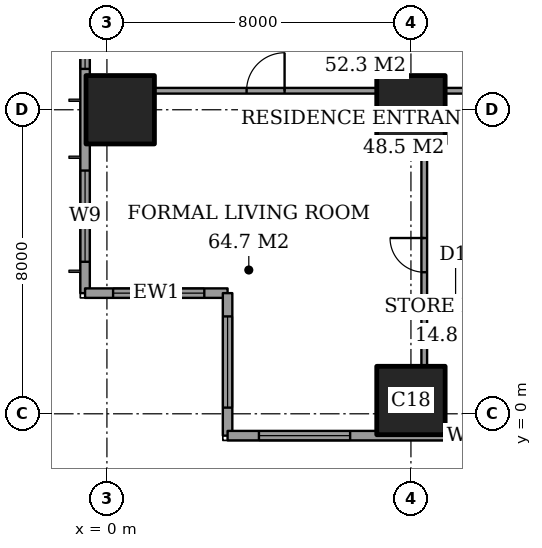
"""IFC4 building model, lengths in metres.
Left out: names, types, materials, properties, quantities, classifications, styles, units other than length and angle.
Written with IfcOpenShell. Run it as: python <this file> out.ifc"""

import sys

from ifc_helpers import new_model, si_unit, direction, frame, frame_2d, origin, origin_2d, place, context, subcontext, project, spatial, rectangle, extrude, element, fill, save


model = new_model("IFC4")
c1 = context("Model", 3, precision=1e-05, world=origin(), true_north=direction((0.0, 1.0)))
c2 = subcontext(c1, "Body", "Model", "MODEL_VIEW")
j1 = project(units=[si_unit("LENGTHUNIT", "METRE"), si_unit("PLANEANGLEUNIT", "RADIAN")], contexts=[c1])
p1 = place(None, origin())
s1 = spatial("IfcSite", under=j1, at=p1, CompositionType="ELEMENT")
p2 = place(p1, origin())
s2 = spatial("IfcBuilding", under=s1, at=p2, CompositionType="ELEMENT")
p3 = place(p2, frame((0.0, 0.0, 207.4)))
s3 = spatial("IfcBuildingStorey", under=s2, at=p3, CompositionType="ELEMENT", Elevation=207.4)
for number, where, z_axis, x_axis in (
    (1, (0.35, 8.0, 0.0), (0.0, 0.0, 1.0), (1.0, 0.0, 0.0)),
    (2, (8.0, 0.35, 0.0), (0.0, 0.0, 1.0), (1.0, 0.0, 0.0)),
    (3, (8.0, 8.0, 0.0), (0.0, 0.0, 1.0), (1.0, 0.0, 0.0)),
):
    element("IfcColumn", number, at=place(p3, frame(where, z_axis=z_axis, x_axis=x_axis)), inside=s3, PredefinedType="COLUMN", context=c2, shape_type="SweptSolid", body=[
        extrude(rectangle(XDim=1.8, YDim=1.8, at=origin_2d()), origin(), (0.0, 0.0, 1.0), 3.6),
    ])
p4 = place(p3, frame((-0.575, 44.825, 0.0), z_axis=(0.0, 0.0, 1.0), x_axis=(0.0, -1.0, 0.0)))
e4 = element("IfcWall", 4, at=p4, inside=s3, PredefinedType="SOLIDWALL", context=c2, shape_type="SweptSolid", body=[
    extrude(rectangle(XDim=41.65, YDim=0.25, at=frame_2d((20.825, 0.0))), origin(), (0.0, 0.0, 1.0), 3.6),
])
p5 = place(p4, frame((0.825, 0.0, 0.2)))
e5 = element("IfcOpeningElement", 5, at=p5, cuts=e4, PredefinedType="OPENING", context=c2, shape_type="SweptSolid", body=[
    extrude(rectangle(XDim=2.4, YDim=2.4, at=frame_2d((1.2, 1.2))), frame((0.0, 0.135, 0.0), z_axis=(0.0, -1.0, 0.0), x_axis=(1.0, 0.0, 0.0)), (0.0, 0.0, 1.0), 0.27),
])
p6 = place(p4, frame((6.075, 0.0, 0.2)))
e6 = element("IfcOpeningElement", 6, at=p6, cuts=e4, PredefinedType="OPENING", context=c2, shape_type="SweptSolid", body=[
    extrude(rectangle(XDim=1.2, YDim=2.4, at=frame_2d((0.6, 1.2))), frame((0.0, 0.135, 0.0), z_axis=(0.0, -1.0, 0.0), x_axis=(1.0, 0.0, 0.0)), (0.0, 0.0, 1.0), 0.27),
])
p7 = place(p4, frame((8.575, 0.0, 0.2)))
e7 = element("IfcOpeningElement", 7, at=p7, cuts=e4, PredefinedType="OPENING", context=c2, shape_type="SweptSolid", body=[
    extrude(rectangle(XDim=2.4, YDim=2.4, at=frame_2d((1.2, 1.2))), frame((0.0, 0.135, 0.0), z_axis=(0.0, -1.0, 0.0), x_axis=(1.0, 0.0, 0.0)), (0.0, 0.0, 1.0), 0.27),
])
p8 = place(p4, frame((15.675, 0.0, 0.2)))
e8 = element("IfcOpeningElement", 8, at=p8, cuts=e4, PredefinedType="OPENING", context=c2, shape_type="SweptSolid", body=[
    extrude(rectangle(XDim=2.4, YDim=2.4, at=frame_2d((1.2, 1.2))), frame((0.0, 0.135, 0.0), z_axis=(0.0, -1.0, 0.0), x_axis=(1.0, 0.0, 0.0)), (0.0, 0.0, 1.0), 0.27),
])
p9 = place(p4, frame((23.575, 0.0, 0.2)))
e9 = element("IfcOpeningElement", 9, at=p9, cuts=e4, PredefinedType="OPENING", context=c2, shape_type="SweptSolid", body=[
    extrude(rectangle(XDim=2.4, YDim=2.4, at=frame_2d((1.2, 1.2))), frame((0.0, 0.135, 0.0), z_axis=(0.0, -1.0, 0.0), x_axis=(1.0, 0.0, 0.0)), (0.0, 0.0, 1.0), 0.27),
])
p10 = place(p4, frame((30.775, 0.0, 0.2)))
e10 = element("IfcOpeningElement", 10, at=p10, cuts=e4, PredefinedType="OPENING", context=c2, shape_type="SweptSolid", body=[
    extrude(rectangle(XDim=2.4, YDim=2.4, at=frame_2d((1.2, 1.2))), frame((0.0, 0.135, 0.0), z_axis=(0.0, -1.0, 0.0), x_axis=(1.0, 0.0, 0.0)), (0.0, 0.0, 1.0), 0.27),
])
p11 = place(p4, frame((34.55, 0.0, 0.2)))
e11 = element("IfcOpeningElement", 11, at=p11, cuts=e4, PredefinedType="OPENING", context=c2, shape_type="SweptSolid", body=[
    extrude(rectangle(XDim=1.2, YDim=2.4, at=frame_2d((0.6, 1.2))), frame((0.0, 0.135, 0.0), z_axis=(0.0, -1.0, 0.0), x_axis=(1.0, 0.0, 0.0)), (0.0, 0.0, 1.0), 0.27),
])
p12 = place(p4, frame((38.425, 0.0, 0.2)))
e12 = element("IfcOpeningElement", 12, at=p12, cuts=e4, PredefinedType="OPENING", context=c2, shape_type="SweptSolid", body=[
    extrude(rectangle(XDim=2.4, YDim=2.4, at=frame_2d((1.2, 1.2))), frame((0.0, 0.135, 0.0), z_axis=(0.0, -1.0, 0.0), x_axis=(1.0, 0.0, 0.0)), (0.0, 0.0, 1.0), 0.27),
])
p13 = place(p3, frame((-0.575, 3.175, 0.0), z_axis=(0.0, 0.0, 1.0), x_axis=(1.0, 0.0, 0.0)))
e13 = element("IfcWall", 13, at=p13, inside=s3, PredefinedType="SOLIDWALL", context=c2, shape_type="SweptSolid", body=[
    extrude(rectangle(XDim=3.75, YDim=0.25, at=frame_2d((1.875, 0.0))), origin(), (0.0, 0.0, 1.0), 3.6),
])
p14 = place(p13, frame((0.738, 0.0, 0.2)))
e14 = element("IfcOpeningElement", 14, at=p14, cuts=e13, PredefinedType="OPENING", context=c2, shape_type="SweptSolid", body=[
    extrude(rectangle(XDim=2.4, YDim=2.4, at=frame_2d((1.2, 1.2))), frame((0.0, 0.135, 0.0), z_axis=(0.0, -1.0, 0.0), x_axis=(1.0, 0.0, 0.0)), (0.0, 0.0, 1.0), 0.27),
])
p15 = place(p3, frame((3.175, 3.175, 0.0), z_axis=(0.0, 0.0, 1.0), x_axis=(0.0, -1.0, 0.0)))
e15 = element("IfcWall", 15, at=p15, inside=s3, PredefinedType="SOLIDWALL", context=c2, shape_type="SweptSolid", body=[
    extrude(rectangle(XDim=3.75, YDim=0.25, at=frame_2d((1.875, 0.0))), origin(), (0.0, 0.0, 1.0), 3.6),
])
p16 = place(p15, frame((0.613, 0.0, 0.2)))
e16 = element("IfcOpeningElement", 16, at=p16, cuts=e15, PredefinedType="OPENING", context=c2, shape_type="SweptSolid", body=[
    extrude(rectangle(XDim=2.4, YDim=2.4, at=frame_2d((1.2, 1.2))), frame((0.0, 0.135, 0.0), z_axis=(0.0, -1.0, 0.0), x_axis=(1.0, 0.0, 0.0)), (0.0, 0.0, 1.0), 0.27),
])
p17 = place(p3, frame((3.175, -0.575, 0.0), z_axis=(0.0, 0.0, 1.0), x_axis=(1.0, 0.0, 0.0)))
e17 = element("IfcWall", 17, at=p17, inside=s3, PredefinedType="SOLIDWALL", context=c2, shape_type="SweptSolid", body=[
    extrude(rectangle(XDim=21.4, YDim=0.25, at=frame_2d((10.7, 0.0))), origin(), (0.0, 0.0, 1.0), 3.6),
])
p18 = place(p17, frame((0.825, 0.0, 0.2)))
e18 = element("IfcOpeningElement", 18, at=p18, cuts=e17, PredefinedType="OPENING", context=c2, shape_type="SweptSolid", body=[
    extrude(rectangle(XDim=2.4, YDim=2.4, at=frame_2d((1.2, 1.2))), frame((0.0, 0.135, 0.0), z_axis=(0.0, -1.0, 0.0), x_axis=(1.0, 0.0, 0.0)), (0.0, 0.0, 1.0), 0.27),
])
p19 = place(p17, frame((6.05, 0.0, 0.2)))
e19 = element("IfcOpeningElement", 19, at=p19, cuts=e17, PredefinedType="OPENING", context=c2, shape_type="SweptSolid", body=[
    extrude(rectangle(XDim=0.6, YDim=2.4, at=frame_2d((0.3, 1.2))), frame((0.0, 0.135, 0.0), z_axis=(0.0, -1.0, 0.0), x_axis=(1.0, 0.0, 0.0)), (0.0, 0.0, 1.0), 0.27),
])
p20 = place(p17, frame((8.175, 0.0, 0.2)))
e20 = element("IfcOpeningElement", 20, at=p20, cuts=e17, PredefinedType="OPENING", context=c2, shape_type="SweptSolid", body=[
    extrude(rectangle(XDim=2.4, YDim=2.4, at=frame_2d((1.2, 1.2))), frame((0.0, 0.135, 0.0), z_axis=(0.0, -1.0, 0.0), x_axis=(1.0, 0.0, 0.0)), (0.0, 0.0, 1.0), 0.27),
])
p21 = place(p17, frame((14.525, 0.0, 0.2)))
e21 = element("IfcOpeningElement", 21, at=p21, cuts=e17, PredefinedType="OPENING", context=c2, shape_type="SweptSolid", body=[
    extrude(rectangle(XDim=1.2, YDim=2.4, at=frame_2d((0.6, 1.2))), frame((0.0, 0.135, 0.0), z_axis=(0.0, -1.0, 0.0), x_axis=(1.0, 0.0, 0.0)), (0.0, 0.0, 1.0), 0.27),
])
p22 = place(p17, frame((17.4, 0.0, 0.2)))
e22 = element("IfcOpeningElement", 22, at=p22, cuts=e17, PredefinedType="OPENING", context=c2, shape_type="SweptSolid", body=[
    extrude(rectangle(XDim=1.2, YDim=2.4, at=frame_2d((0.6, 1.2))), frame((0.0, 0.135, 0.0), z_axis=(0.0, -1.0, 0.0), x_axis=(1.0, 0.0, 0.0)), (0.0, 0.0, 1.0), 0.27),
])
p23 = place(p3, frame((1.25, 8.5, 0.0), z_axis=(0.0, 0.0, 1.0), x_axis=(1.0, 0.0, 0.0)))
e23 = element("IfcWall", 23, at=p23, inside=s3, PredefinedType="PARTITIONING", context=c2, shape_type="SweptSolid", body=[
    extrude(rectangle(XDim=5.85, YDim=0.15, at=frame_2d((2.925, 0.0))), origin(), (0.0, 0.0, 1.0), 3.35),
])
p24 = place(p23, frame((2.425, 0.0, 0.0)))
e24 = element("IfcOpeningElement", 24, at=p24, cuts=e23, PredefinedType="OPENING", context=c2, shape_type="SweptSolid", body=[
    extrude(rectangle(XDim=1.0, YDim=2.1, at=frame_2d((0.5, 1.05))), frame((0.0, 0.085, 0.0), z_axis=(0.0, -1.0, 0.0), x_axis=(1.0, 0.0, 0.0)), (0.0, 0.0, 1.0), 0.17),
])
p25 = place(p3, frame((8.9, 8.5, 0.0), z_axis=(0.0, 0.0, 1.0), x_axis=(1.0, 0.0, 0.0)))
e25 = element("IfcWall", 25, at=p25, inside=s3, PredefinedType="PARTITIONING", context=c2, shape_type="SweptSolid", body=[
    extrude(rectangle(XDim=6.2, YDim=0.15, at=frame_2d((3.1, 0.0))), origin(), (0.0, 0.0, 1.0), 3.35),
])
p26 = place(p25, frame((3.15, 0.0, 0.0)))
e26 = element("IfcOpeningElement", 26, at=p26, cuts=e25, PredefinedType="OPENING", context=c2, shape_type="SweptSolid", body=[
    extrude(rectangle(XDim=1.0, YDim=2.1, at=frame_2d((0.5, 1.05))), frame((0.0, 0.085, 0.0), z_axis=(0.0, -1.0, 0.0), x_axis=(1.0, 0.0, 0.0)), (0.0, 0.0, 1.0), 0.17),
])
p27 = place(p3, frame((8.35, 1.25, 0.0), z_axis=(0.0, 0.0, 1.0), x_axis=(0.0, 1.0, 0.0)))
e27 = element("IfcWall", 27, at=p27, inside=s3, PredefinedType="PARTITIONING", context=c2, shape_type="SweptSolid", body=[
    extrude(rectangle(XDim=5.85, YDim=0.15, at=frame_2d((2.925, 0.0))), origin(), (0.0, 0.0, 1.0), 3.35),
])
p28 = place(p27, frame((2.475, 0.0, 0.0)))
e28 = element("IfcOpeningElement", 28, at=p28, cuts=e27, PredefinedType="OPENING", context=c2, shape_type="SweptSolid", body=[
    extrude(rectangle(XDim=0.9, YDim=2.1, at=frame_2d((0.45, 1.05))), frame((0.0, 0.085, 0.0), z_axis=(0.0, -1.0, 0.0), x_axis=(1.0, 0.0, 0.0)), (0.0, 0.0, 1.0), 0.17),
])
p29 = place(p11, origin())
e29 = element("IfcWindow", 29, at=p29, inside=s3, PartitioningType="SINGLE_PANEL", PredefinedType="WINDOW", context=c2, shape_type="SweptSolid", body=[
    extrude(rectangle(XDim=1.2, YDim=2.4, at=frame_2d((0.6, 1.2))), frame((0.0, 0.03, 0.0), z_axis=(0.0, -1.0, 0.0), x_axis=(1.0, 0.0, 0.0)), (0.0, 0.0, 1.0), 0.06),
])
fill(e11, e29)
p30 = place(p12, origin())
e30 = element("IfcWindow", 30, at=p30, inside=s3, PartitioningType="SINGLE_PANEL", PredefinedType="WINDOW", context=c2, shape_type="SweptSolid", body=[
    extrude(rectangle(XDim=2.4, YDim=2.4, at=frame_2d((1.2, 1.2))), frame((0.0, 0.03, 0.0), z_axis=(0.0, -1.0, 0.0), x_axis=(1.0, 0.0, 0.0)), (0.0, 0.0, 1.0), 0.06),
])
fill(e12, e30)
p31 = place(p14, origin())
e31 = element("IfcWindow", 31, at=p31, inside=s3, PartitioningType="SINGLE_PANEL", PredefinedType="WINDOW", context=c2, shape_type="SweptSolid", body=[
    extrude(rectangle(XDim=2.4, YDim=2.4, at=frame_2d((1.2, 1.2))), frame((0.0, 0.03, 0.0), z_axis=(0.0, -1.0, 0.0), x_axis=(1.0, 0.0, 0.0)), (0.0, 0.0, 1.0), 0.06),
])
fill(e14, e31)
p32 = place(p16, origin())
e32 = element("IfcWindow", 32, at=p32, inside=s3, PartitioningType="SINGLE_PANEL", PredefinedType="WINDOW", context=c2, shape_type="SweptSolid", body=[
    extrude(rectangle(XDim=2.4, YDim=2.4, at=frame_2d((1.2, 1.2))), frame((0.0, 0.03, 0.0), z_axis=(0.0, -1.0, 0.0), x_axis=(1.0, 0.0, 0.0)), (0.0, 0.0, 1.0), 0.06),
])
fill(e16, e32)
p33 = place(p18, origin())
e33 = element("IfcWindow", 33, at=p33, inside=s3, PartitioningType="SINGLE_PANEL", PredefinedType="WINDOW", context=c2, shape_type="SweptSolid", body=[
    extrude(rectangle(XDim=2.4, YDim=2.4, at=frame_2d((1.2, 1.2))), frame((0.0, 0.03, 0.0), z_axis=(0.0, -1.0, 0.0), x_axis=(1.0, 0.0, 0.0)), (0.0, 0.0, 1.0), 0.06),
])
fill(e18, e33)
p34 = place(p19, origin())
e34 = element("IfcWindow", 34, at=p34, inside=s3, PartitioningType="SINGLE_PANEL", PredefinedType="WINDOW", context=c2, shape_type="SweptSolid", body=[
    extrude(rectangle(XDim=0.6, YDim=2.4, at=frame_2d((0.3, 1.2))), frame((0.0, 0.03, 0.0), z_axis=(0.0, -1.0, 0.0), x_axis=(1.0, 0.0, 0.0)), (0.0, 0.0, 1.0), 0.06),
])
fill(e19, e34)
p35 = place(p24, origin())
e35 = element("IfcDoor", 35, at=p35, inside=s3, OperationType="SINGLE_SWING_LEFT", PredefinedType="DOOR", context=c2, shape_type="SweptSolid", body=[
    extrude(rectangle(XDim=1.0, YDim=2.1, at=frame_2d((0.5, 1.05))), frame((0.0, 0.025, 0.0), z_axis=(0.0, -1.0, 0.0), x_axis=(1.0, 0.0, 0.0)), (0.0, 0.0, 1.0), 0.05),
])
fill(e24, e35)
p36 = place(p28, origin())
e36 = element("IfcDoor", 36, at=p36, inside=s3, OperationType="SINGLE_SWING_LEFT", PredefinedType="DOOR", context=c2, shape_type="SweptSolid", body=[
    extrude(rectangle(XDim=0.9, YDim=2.1, at=frame_2d((0.45, 1.05))), frame((0.0, 0.025, 0.0), z_axis=(0.0, -1.0, 0.0), x_axis=(1.0, 0.0, 0.0)), (0.0, 0.0, 1.0), 0.05),
])
fill(e28, e36)
save(model, sys.argv[1])
